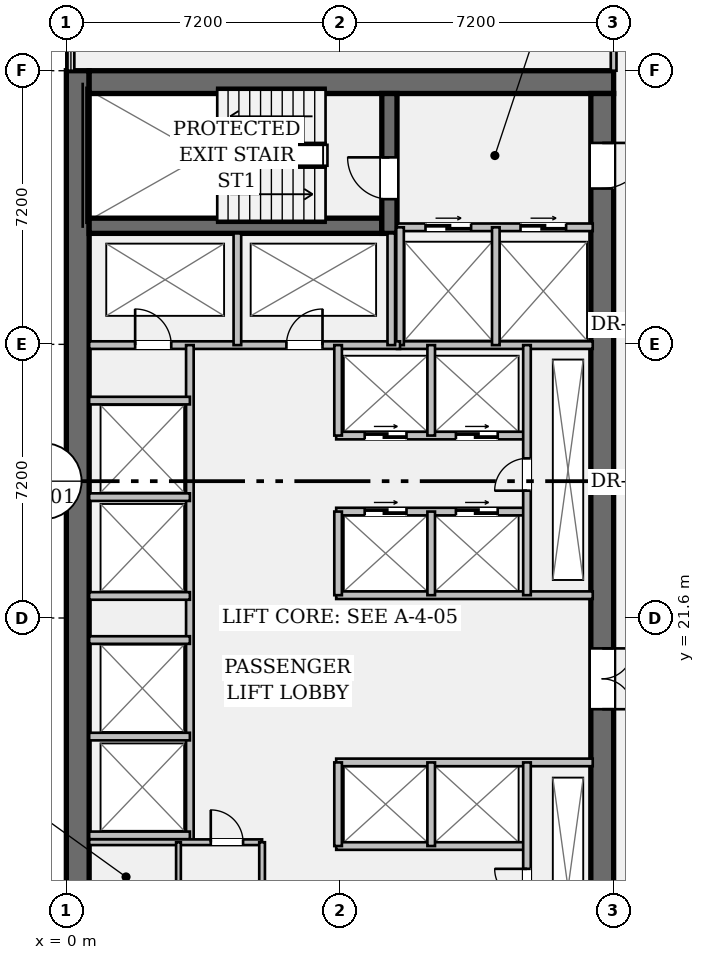
"""IFC4 building model, lengths in metres.
Left out: names, types, materials, properties, quantities, classifications, styles, units other than length and angle.
Written with IfcOpenShell. Run it as: python <this file> out.ifc"""

import sys

from ifc_helpers import new_model, si_unit, direction, frame, frame_2d, origin, place, context, subcontext, project, spatial, rectangle, extrude, element, fill, save


model = new_model("IFC4")
c1 = context("Model", 3, precision=1e-05, world=origin(), true_north=direction((0.0, 1.0)))
c2 = subcontext(c1, "Body", "Model", "MODEL_VIEW")
j1 = project(units=[si_unit("LENGTHUNIT", "METRE"), si_unit("PLANEANGLEUNIT", "RADIAN")], contexts=[c1])
p1 = place(None, origin())
s1 = spatial("IfcSite", under=j1, at=p1, CompositionType="ELEMENT")
p2 = place(p1, origin())
s2 = spatial("IfcBuilding", under=s1, at=p2, CompositionType="ELEMENT")
p3 = place(p2, frame((0.0, 0.0, 81.2)))
s3 = spatial("IfcBuildingStorey", under=s2, at=p3, CompositionType="ELEMENT", Elevation=81.2)
p4 = place(p3, frame((0.3, 7.2, 0.0), z_axis=(0.0, 0.0, 1.0), x_axis=(0.0, 1.0, 0.0)))
e1 = element("IfcWall", 1, at=p4, inside=s3, PredefinedType="SHEAR", context=c2, shape_type="SweptSolid", body=[
    extrude(rectangle(XDim=28.8, YDim=0.6, at=frame_2d((14.4, 0.0))), origin(), (0.0, 0.0, 1.0), 3.57),
])
p5 = place(p3, frame((0.6, 35.7, 0.0), z_axis=(0.0, 0.0, 1.0), x_axis=(1.0, 0.0, 0.0)))
e2 = element("IfcWall", 2, at=p5, inside=s3, PredefinedType="SHEAR", context=c2, shape_type="SweptSolid", body=[
    extrude(rectangle(XDim=13.8, YDim=0.6, at=frame_2d((6.9, 0.0))), origin(), (0.0, 0.0, 1.0), 3.57),
])
p6 = place(p3, frame((14.1, 35.4, 0.0), z_axis=(0.0, 0.0, 1.0), x_axis=(0.0, -1.0, 0.0)))
e3 = element("IfcWall", 3, at=p6, inside=s3, PredefinedType="SHEAR", context=c2, shape_type="SweptSolid", body=[
    extrude(rectangle(XDim=27.6, YDim=0.6, at=frame_2d((13.8, 0.0))), origin(), (0.0, 0.0, 1.0), 3.57),
])
p7 = place(p6, frame((1.3, 0.0, 0.0)))
e4 = element("IfcOpeningElement", 4, at=p7, cuts=e3, PredefinedType="OPENING", context=c2, shape_type="SweptSolid", body=[
    extrude(rectangle(XDim=1.2, YDim=2.15, at=frame_2d((0.6, 1.075))), frame((0.0, 0.312, 0.0), z_axis=(0.0, -1.0, 0.0), x_axis=(1.0, 0.0, 0.0)), (0.0, 0.0, 1.0), 0.624),
])
p8 = place(p6, frame((25.25, 0.0, 0.0)))
e5 = element("IfcOpeningElement", 5, at=p8, cuts=e3, PredefinedType="OPENING", context=c2, shape_type="SweptSolid", body=[
    extrude(rectangle(XDim=1.2, YDim=2.15, at=frame_2d((0.6, 1.075))), frame((0.0, 0.312, 0.0), z_axis=(0.0, -1.0, 0.0), x_axis=(1.0, 0.0, 0.0)), (0.0, 0.0, 1.0), 0.624),
])
p9 = place(p6, frame((14.6, 0.0, 0.0)))
e6 = element("IfcOpeningElement", 6, at=p9, cuts=e3, PredefinedType="OPENING", context=c2, shape_type="SweptSolid", body=[
    extrude(rectangle(XDim=1.6, YDim=2.2, at=frame_2d((0.8, 1.1))), frame((0.0, 0.312, 0.0), z_axis=(0.0, -1.0, 0.0), x_axis=(1.0, 0.0, 0.0)), (0.0, 0.0, 1.0), 0.624),
])
p10 = place(p3, frame((0.6, 31.92, 0.0), z_axis=(0.0, 0.0, 1.0), x_axis=(1.0, 0.0, 0.0)))
e7 = element("IfcWall", 7, at=p10, inside=s3, PredefinedType="SHEAR", context=c2, shape_type="SweptSolid", body=[
    extrude(rectangle(XDim=7.7, YDim=0.4, at=frame_2d((3.85, 0.0))), origin(), (0.0, 0.0, 1.0), 3.57),
])
p11 = place(p3, frame((8.5, 31.72, 0.0), z_axis=(0.0, 0.0, 1.0), x_axis=(0.0, 1.0, 0.0)))
e8 = element("IfcWall", 8, at=p11, inside=s3, PredefinedType="SHEAR", context=c2, shape_type="SweptSolid", body=[
    extrude(rectangle(XDim=3.68, YDim=0.4, at=frame_2d((1.84, 0.0))), origin(), (0.0, 0.0, 1.0), 3.57),
])
p12 = place(p11, frame((0.9, 0.0, 0.0)))
e9 = element("IfcOpeningElement", 9, at=p12, cuts=e8, PredefinedType="OPENING", context=c2, shape_type="SweptSolid", body=[
    extrude(rectangle(XDim=1.1, YDim=2.15, at=frame_2d((0.55, 1.075))), frame((0.0, 0.212, 0.0), z_axis=(0.0, -1.0, 0.0), x_axis=(1.0, 0.0, 0.0)), (0.0, 0.0, 1.0), 0.424),
])
p13 = place(p3, frame((8.7, 31.88, 0.0), z_axis=(0.0, 0.0, 1.0), x_axis=(1.0, 0.0, 0.0)))
e10 = element("IfcWall", 10, at=p13, inside=s3, PredefinedType="PARTITIONING", context=c2, shape_type="SweptSolid", body=[
    extrude(rectangle(XDim=5.15, YDim=0.2, at=frame_2d((2.575, 0.0))), origin(), (0.0, 0.0, 1.0), 3.57),
])
p14 = place(p13, frame((0.75, 0.0, 0.0)))
e11 = element("IfcOpeningElement", 11, at=p14, cuts=e10, PredefinedType="OPENING", context=c2, shape_type="SweptSolid", body=[
    extrude(rectangle(XDim=1.2, YDim=2.2, at=frame_2d((0.6, 1.1))), frame((0.0, 0.112, 0.0), z_axis=(0.0, -1.0, 0.0), x_axis=(1.0, 0.0, 0.0)), (0.0, 0.0, 1.0), 0.224),
])
p15 = place(p13, frame((3.25, 0.0, 0.0)))
e12 = element("IfcOpeningElement", 12, at=p15, cuts=e10, PredefinedType="OPENING", context=c2, shape_type="SweptSolid", body=[
    extrude(rectangle(XDim=1.2, YDim=2.2, at=frame_2d((0.6, 1.1))), frame((0.0, 0.112, 0.0), z_axis=(0.0, -1.0, 0.0), x_axis=(1.0, 0.0, 0.0)), (0.0, 0.0, 1.0), 0.224),
])
p16 = place(p3, frame((8.7, 28.78, 0.0), z_axis=(0.0, 0.0, 1.0), x_axis=(1.0, 0.0, 0.0)))
e13 = element("IfcWall", 13, at=p16, inside=s3, PredefinedType="PARTITIONING", context=c2, shape_type="SweptSolid", body=[
    extrude(rectangle(XDim=5.15, YDim=0.2, at=frame_2d((2.575, 0.0))), origin(), (0.0, 0.0, 1.0), 3.57),
])
for number, where, z_axis, x_axis in (
    (14, (8.78, 28.78, 0.0), (0.0, 0.0, 1.0), (0.0, 1.0, 0.0)),
    (15, (11.3, 28.78, 0.0), (0.0, 0.0, 1.0), (0.0, 1.0, 0.0)),
):
    element("IfcWall", number, at=place(p3, frame(where, z_axis=z_axis, x_axis=x_axis)), inside=s3, PredefinedType="PARTITIONING", context=c2, shape_type="SweptSolid", body=[
        extrude(rectangle(XDim=3.1, YDim=0.2, at=frame_2d((1.55, 0.0))), origin(), (0.0, 0.0, 1.0), 3.57),
    ])
p17 = place(p3, frame((0.6, 28.78, 0.0), z_axis=(0.0, 0.0, 1.0), x_axis=(1.0, 0.0, 0.0)))
e16 = element("IfcWall", 16, at=p17, inside=s3, PredefinedType="PARTITIONING", context=c2, shape_type="SweptSolid", body=[
    extrude(rectangle(XDim=8.18, YDim=0.2, at=frame_2d((4.09, 0.0))), origin(), (0.0, 0.0, 1.0), 3.57),
])
p18 = place(p17, frame((1.21, 0.0, 0.0)))
e17 = element("IfcOpeningElement", 17, at=p18, cuts=e16, PredefinedType="OPENING", context=c2, shape_type="SweptSolid", body=[
    extrude(rectangle(XDim=0.95, YDim=2.15, at=frame_2d((0.475, 1.075))), frame((0.0, 0.112, 0.0), z_axis=(0.0, -1.0, 0.0), x_axis=(1.0, 0.0, 0.0)), (0.0, 0.0, 1.0), 0.224),
])
p19 = place(p17, frame((5.19, 0.0, 0.0)))
e18 = element("IfcOpeningElement", 18, at=p19, cuts=e16, PredefinedType="OPENING", context=c2, shape_type="SweptSolid", body=[
    extrude(rectangle(XDim=0.95, YDim=2.15, at=frame_2d((0.475, 1.075))), frame((0.0, 0.112, 0.0), z_axis=(0.0, -1.0, 0.0), x_axis=(1.0, 0.0, 0.0)), (0.0, 0.0, 1.0), 0.224),
])
for number, where, z_axis, x_axis in (
    (19, (4.5, 28.78, 0.0), (0.0, 0.0, 1.0), (0.0, 1.0, 0.0)),
    (20, (8.55, 28.78, 0.0), (0.0, 0.0, 1.0), (0.0, 1.0, 0.0)),
):
    element("IfcWall", number, at=place(p3, frame(where, z_axis=z_axis, x_axis=x_axis)), inside=s3, PredefinedType="PARTITIONING", context=c2, shape_type="SweptSolid", body=[
        extrude(rectangle(XDim=2.94, YDim=0.2, at=frame_2d((1.47, 0.0))), origin(), (0.0, 0.0, 1.0), 3.57),
    ])
p20 = place(p3, frame((3.25, 15.7, 0.0), z_axis=(0.0, 0.0, 1.0), x_axis=(0.0, 1.0, 0.0)))
e21 = element("IfcWall", 21, at=p20, inside=s3, PredefinedType="PARTITIONING", context=c2, shape_type="SweptSolid", body=[
    extrude(rectangle(XDim=13.08, YDim=0.2, at=frame_2d((6.54, 0.0))), origin(), (0.0, 0.0, 1.0), 3.57),
])
for number, where, z_axis, x_axis in (
    (22, (0.6, 15.88, 0.0), (0.0, 0.0, 1.0), (1.0, 0.0, 0.0)),
    (23, (0.6, 18.48, 0.0), (0.0, 0.0, 1.0), (1.0, 0.0, 0.0)),
    (24, (0.6, 22.18, 0.0), (0.0, 0.0, 1.0), (1.0, 0.0, 0.0)),
    (25, (0.6, 24.78, 0.0), (0.0, 0.0, 1.0), (1.0, 0.0, 0.0)),
    (26, (0.6, 21.02, 0.0), (0.0, 0.0, 1.0), (1.0, 0.0, 0.0)),
    (27, (0.6, 27.32, 0.0), (0.0, 0.0, 1.0), (1.0, 0.0, 0.0)),
):
    element("IfcWall", number, at=place(p3, frame(where, z_axis=z_axis, x_axis=x_axis)), inside=s3, PredefinedType="PARTITIONING", context=c2, shape_type="SweptSolid", body=[
        extrude(rectangle(XDim=2.65, YDim=0.2, at=frame_2d((1.325, 0.0))), origin(), (0.0, 0.0, 1.0), 3.57),
    ])
p21 = place(p3, frame((7.1, 22.2, 0.0), z_axis=(0.0, 0.0, 1.0), x_axis=(1.0, 0.0, 0.0)))
e28 = element("IfcWall", 28, at=p21, inside=s3, PredefinedType="PARTITIONING", context=c2, shape_type="SweptSolid", body=[
    extrude(rectangle(XDim=6.75, YDim=0.2, at=frame_2d((3.375, 0.0))), origin(), (0.0, 0.0, 1.0), 3.57),
])
p22 = place(p3, frame((7.1, 24.4, 0.0), z_axis=(0.0, 0.0, 1.0), x_axis=(1.0, 0.0, 0.0)))
e29 = element("IfcWall", 29, at=p22, inside=s3, PredefinedType="PARTITIONING", context=c2, shape_type="SweptSolid", body=[
    extrude(rectangle(XDim=5.02, YDim=0.2, at=frame_2d((2.51, 0.0))), origin(), (0.0, 0.0, 1.0), 3.57),
])
p23 = place(p22, frame((0.75, 0.0, 0.0)))
e30 = element("IfcOpeningElement", 30, at=p23, cuts=e29, PredefinedType="OPENING", context=c2, shape_type="SweptSolid", body=[
    extrude(rectangle(XDim=1.1, YDim=2.2, at=frame_2d((0.55, 1.1))), frame((0.0, 0.112, 0.0), z_axis=(0.0, -1.0, 0.0), x_axis=(1.0, 0.0, 0.0)), (0.0, 0.0, 1.0), 0.224),
])
p24 = place(p22, frame((3.15, 0.0, 0.0)))
e31 = element("IfcOpeningElement", 31, at=p24, cuts=e29, PredefinedType="OPENING", context=c2, shape_type="SweptSolid", body=[
    extrude(rectangle(XDim=1.1, YDim=2.2, at=frame_2d((0.55, 1.1))), frame((0.0, 0.112, 0.0), z_axis=(0.0, -1.0, 0.0), x_axis=(1.0, 0.0, 0.0)), (0.0, 0.0, 1.0), 0.224),
])
p25 = place(p3, frame((7.1, 26.4, 0.0), z_axis=(0.0, 0.0, 1.0), x_axis=(1.0, 0.0, 0.0)))
e32 = element("IfcWall", 32, at=p25, inside=s3, PredefinedType="PARTITIONING", context=c2, shape_type="SweptSolid", body=[
    extrude(rectangle(XDim=5.02, YDim=0.2, at=frame_2d((2.51, 0.0))), origin(), (0.0, 0.0, 1.0), 3.57),
])
p26 = place(p25, frame((0.75, 0.0, 0.0)))
e33 = element("IfcOpeningElement", 33, at=p26, cuts=e32, PredefinedType="OPENING", context=c2, shape_type="SweptSolid", body=[
    extrude(rectangle(XDim=1.1, YDim=2.2, at=frame_2d((0.55, 1.1))), frame((0.0, 0.112, 0.0), z_axis=(0.0, -1.0, 0.0), x_axis=(1.0, 0.0, 0.0)), (0.0, 0.0, 1.0), 0.224),
])
p27 = place(p25, frame((3.15, 0.0, 0.0)))
e34 = element("IfcOpeningElement", 34, at=p27, cuts=e32, PredefinedType="OPENING", context=c2, shape_type="SweptSolid", body=[
    extrude(rectangle(XDim=1.1, YDim=2.2, at=frame_2d((0.55, 1.1))), frame((0.0, 0.112, 0.0), z_axis=(0.0, -1.0, 0.0), x_axis=(1.0, 0.0, 0.0)), (0.0, 0.0, 1.0), 0.224),
])
p28 = place(p3, frame((7.15, 22.2, 0.0), z_axis=(0.0, 0.0, 1.0), x_axis=(0.0, 1.0, 0.0)))
e35 = element("IfcWall", 35, at=p28, inside=s3, PredefinedType="PARTITIONING", context=c2, shape_type="SweptSolid", body=[
    extrude(rectangle(XDim=2.2, YDim=0.2, at=frame_2d((1.1, 0.0))), origin(), (0.0, 0.0, 1.0), 3.57),
])
p29 = place(p3, frame((7.15, 26.4, 0.0), z_axis=(0.0, 0.0, 1.0), x_axis=(0.0, 1.0, 0.0)))
e36 = element("IfcWall", 36, at=p29, inside=s3, PredefinedType="PARTITIONING", context=c2, shape_type="SweptSolid", body=[
    extrude(rectangle(XDim=2.38, YDim=0.2, at=frame_2d((1.19, 0.0))), origin(), (0.0, 0.0, 1.0), 3.57),
])
p30 = place(p3, frame((9.6, 22.2, 0.0), z_axis=(0.0, 0.0, 1.0), x_axis=(0.0, 1.0, 0.0)))
e37 = element("IfcWall", 37, at=p30, inside=s3, PredefinedType="PARTITIONING", context=c2, shape_type="SweptSolid", body=[
    extrude(rectangle(XDim=2.2, YDim=0.2, at=frame_2d((1.1, 0.0))), origin(), (0.0, 0.0, 1.0), 3.57),
])
p31 = place(p3, frame((9.6, 26.4, 0.0), z_axis=(0.0, 0.0, 1.0), x_axis=(0.0, 1.0, 0.0)))
e38 = element("IfcWall", 38, at=p31, inside=s3, PredefinedType="PARTITIONING", context=c2, shape_type="SweptSolid", body=[
    extrude(rectangle(XDim=2.38, YDim=0.2, at=frame_2d((1.19, 0.0))), origin(), (0.0, 0.0, 1.0), 3.57),
])
p32 = place(p3, frame((12.12, 22.2, 0.0), z_axis=(0.0, 0.0, 1.0), x_axis=(0.0, 1.0, 0.0)))
e39 = element("IfcWall", 39, at=p32, inside=s3, PredefinedType="PARTITIONING", context=c2, shape_type="SweptSolid", body=[
    extrude(rectangle(XDim=6.58, YDim=0.2, at=frame_2d((3.29, 0.0))), origin(), (0.0, 0.0, 1.0), 3.57),
])
p33 = place(p32, frame((2.75, 0.0, 0.0)))
e40 = element("IfcOpeningElement", 40, at=p33, cuts=e39, PredefinedType="OPENING", context=c2, shape_type="SweptSolid", body=[
    extrude(rectangle(XDim=0.85, YDim=2.15, at=frame_2d((0.425, 1.075))), frame((0.0, 0.112, 0.0), z_axis=(0.0, -1.0, 0.0), x_axis=(1.0, 0.0, 0.0)), (0.0, 0.0, 1.0), 0.224),
])
p34 = place(p3, frame((7.1, 17.8, 0.0), z_axis=(0.0, 0.0, 1.0), x_axis=(1.0, 0.0, 0.0)))
e41 = element("IfcWall", 41, at=p34, inside=s3, PredefinedType="PARTITIONING", context=c2, shape_type="SweptSolid", body=[
    extrude(rectangle(XDim=6.75, YDim=0.2, at=frame_2d((3.375, 0.0))), origin(), (0.0, 0.0, 1.0), 3.57),
])
p35 = place(p3, frame((7.1, 15.6, 0.0), z_axis=(0.0, 0.0, 1.0), x_axis=(1.0, 0.0, 0.0)))
e42 = element("IfcWall", 42, at=p35, inside=s3, PredefinedType="PARTITIONING", context=c2, shape_type="SweptSolid", body=[
    extrude(rectangle(XDim=5.02, YDim=0.2, at=frame_2d((2.51, 0.0))), origin(), (0.0, 0.0, 1.0), 3.57),
])
for number, where, z_axis, x_axis in (
    (43, (7.15, 15.6, 0.0), (0.0, 0.0, 1.0), (0.0, 1.0, 0.0)),
    (44, (9.6, 15.6, 0.0), (0.0, 0.0, 1.0), (0.0, 1.0, 0.0)),
):
    element("IfcWall", number, at=place(p3, frame(where, z_axis=z_axis, x_axis=x_axis)), inside=s3, PredefinedType="PARTITIONING", context=c2, shape_type="SweptSolid", body=[
        extrude(rectangle(XDim=2.2, YDim=0.2, at=frame_2d((1.1, 0.0))), origin(), (0.0, 0.0, 1.0), 3.57),
    ])
p36 = place(p3, frame((12.12, 11.2, 0.0), z_axis=(0.0, 0.0, 1.0), x_axis=(0.0, 1.0, 0.0)))
e45 = element("IfcWall", 45, at=p36, inside=s3, PredefinedType="PARTITIONING", context=c2, shape_type="SweptSolid", body=[
    extrude(rectangle(XDim=6.6, YDim=0.2, at=frame_2d((3.3, 0.0))), origin(), (0.0, 0.0, 1.0), 3.57),
])
p37 = place(p36, frame((2.95, 0.0, 0.0)))
e46 = element("IfcOpeningElement", 46, at=p37, cuts=e45, PredefinedType="OPENING", context=c2, shape_type="SweptSolid", body=[
    extrude(rectangle(XDim=0.85, YDim=2.15, at=frame_2d((0.425, 1.075))), frame((0.0, 0.112, 0.0), z_axis=(0.0, -1.0, 0.0), x_axis=(1.0, 0.0, 0.0)), (0.0, 0.0, 1.0), 0.224),
])
p38 = place(p3, frame((0.6, 15.7, 0.0), z_axis=(0.0, 0.0, 1.0), x_axis=(1.0, 0.0, 0.0)))
e47 = element("IfcWall", 47, at=p38, inside=s3, PredefinedType="PARTITIONING", context=c2, shape_type="SweptSolid", body=[
    extrude(rectangle(XDim=4.55, YDim=0.15, at=frame_2d((2.275, 0.0))), origin(), (0.0, 0.0, 1.0), 3.57),
])
p39 = place(p38, frame((3.2, 0.0, 0.0)))
e48 = element("IfcOpeningElement", 48, at=p39, cuts=e47, PredefinedType="OPENING", context=c2, shape_type="SweptSolid", body=[
    extrude(rectangle(XDim=0.85, YDim=2.15, at=frame_2d((0.425, 1.075))), frame((0.0, 0.087, 0.0), z_axis=(0.0, -1.0, 0.0), x_axis=(1.0, 0.0, 0.0)), (0.0, 0.0, 1.0), 0.174),
])
p40 = place(p3, frame((5.15, 11.28, 0.0), z_axis=(0.0, 0.0, 1.0), x_axis=(0.0, 1.0, 0.0)))
e49 = element("IfcWall", 49, at=p40, inside=s3, PredefinedType="PARTITIONING", context=c2, shape_type="SweptSolid", body=[
    extrude(rectangle(XDim=4.42, YDim=0.15, at=frame_2d((2.21, 0.0))), origin(), (0.0, 0.0, 1.0), 3.57),
])
p41 = place(p3, frame((2.95, 11.28, 0.0), z_axis=(0.0, 0.0, 1.0), x_axis=(0.0, 1.0, 0.0)))
e50 = element("IfcWall", 50, at=p41, inside=s3, PredefinedType="PARTITIONING", context=c2, shape_type="SweptSolid", body=[
    extrude(rectangle(XDim=4.42, YDim=0.125, at=frame_2d((2.21, 0.0))), origin(), (0.0, 0.0, 1.0), 3.57),
])
p42 = place(p41, frame((1.6, 0.0, 0.0)))
e51 = element("IfcOpeningElement", 51, at=p42, cuts=e50, PredefinedType="OPENING", context=c2, shape_type="SweptSolid", body=[
    extrude(rectangle(XDim=0.85, YDim=2.15, at=frame_2d((0.425, 1.075))), frame((0.0, 0.074, 0.0), z_axis=(0.0, -1.0, 0.0), x_axis=(1.0, 0.0, 0.0)), (0.0, 0.0, 1.0), 0.149),
])
p43 = place(p3, frame((14.4, 36.0, 0.0), z_axis=(0.0, 0.0, 1.0), x_axis=(0.0, 1.0, 0.0)))
e52 = element("IfcWall", 52, at=p43, inside=s3, PredefinedType="PARTITIONING", context=c2, shape_type="SweptSolid", body=[
    extrude(rectangle(XDim=7.08, YDim=0.15, at=frame_2d((3.54, 0.0))), origin(), (0.0, 0.0, 1.0), 2.783),
])
p44 = place(p43, frame((0.65, 0.0, 0.0)))
e53 = element("IfcOpeningElement", 53, at=p44, cuts=e52, PredefinedType="OPENING", context=c2, shape_type="SweptSolid", body=[
    extrude(rectangle(XDim=0.9, YDim=2.15, at=frame_2d((0.45, 1.075))), frame((0.0, 0.087, 0.0), z_axis=(0.0, -1.0, 0.0), x_axis=(1.0, 0.0, 0.0)), (0.0, 0.0, 1.0), 0.174),
])
p45 = place(p12, origin())
e54 = element("IfcDoor", 54, at=p45, inside=s3, OperationType="SINGLE_SWING_RIGHT", PredefinedType="DOOR", context=c2, shape_type="SweptSolid", body=[
    extrude(rectangle(XDim=1.1, YDim=2.15, at=frame_2d((0.55, 1.075))), frame((0.0, 0.025, 0.0), z_axis=(0.0, -1.0, 0.0), x_axis=(1.0, 0.0, 0.0)), (0.0, 0.0, 1.0), 0.05),
])
fill(e9, e54)
p46 = place(p7, origin())
e55 = element("IfcDoor", 55, at=p46, inside=s3, OperationType="SINGLE_SWING_LEFT", PredefinedType="DOOR", context=c2, shape_type="SweptSolid", body=[
    extrude(rectangle(XDim=1.2, YDim=2.15, at=frame_2d((0.6, 1.075))), frame((0.0, 0.025, 0.0), z_axis=(0.0, -1.0, 0.0), x_axis=(1.0, 0.0, 0.0)), (0.0, 0.0, 1.0), 0.05),
])
fill(e4, e55)
p47 = place(p14, origin())
e56 = element("IfcDoor", 56, at=p47, inside=s3, OperationType="DOUBLE_DOOR_SLIDING", PredefinedType="DOOR", context=c2, shape_type="SweptSolid", body=[
    extrude(rectangle(XDim=1.2, YDim=2.2, at=frame_2d((0.6, 1.1))), frame((0.0, 0.025, 0.0), z_axis=(0.0, -1.0, 0.0), x_axis=(1.0, 0.0, 0.0)), (0.0, 0.0, 1.0), 0.05),
])
fill(e11, e56)
p48 = place(p15, origin())
e57 = element("IfcDoor", 57, at=p48, inside=s3, OperationType="DOUBLE_DOOR_SLIDING", PredefinedType="DOOR", context=c2, shape_type="SweptSolid", body=[
    extrude(rectangle(XDim=1.2, YDim=2.2, at=frame_2d((0.6, 1.1))), frame((0.0, 0.025, 0.0), z_axis=(0.0, -1.0, 0.0), x_axis=(1.0, 0.0, 0.0)), (0.0, 0.0, 1.0), 0.05),
])
fill(e12, e57)
p49 = place(p18, origin())
e58 = element("IfcDoor", 58, at=p49, inside=s3, OperationType="SINGLE_SWING_LEFT", PredefinedType="DOOR", context=c2, shape_type="SweptSolid", body=[
    extrude(rectangle(XDim=0.95, YDim=2.15, at=frame_2d((0.475, 1.075))), frame((0.0, 0.025, 0.0), z_axis=(0.0, -1.0, 0.0), x_axis=(1.0, 0.0, 0.0)), (0.0, 0.0, 1.0), 0.05),
])
fill(e17, e58)
p50 = place(p19, origin())
e59 = element("IfcDoor", 59, at=p50, inside=s3, OperationType="SINGLE_SWING_RIGHT", PredefinedType="DOOR", context=c2, shape_type="SweptSolid", body=[
    extrude(rectangle(XDim=0.95, YDim=2.15, at=frame_2d((0.475, 1.075))), frame((0.0, 0.025, 0.0), z_axis=(0.0, -1.0, 0.0), x_axis=(1.0, 0.0, 0.0)), (0.0, 0.0, 1.0), 0.05),
])
fill(e18, e59)
p51 = place(p9, origin())
e60 = element("IfcDoor", 60, at=p51, inside=s3, OperationType="DOUBLE_DOOR_SINGLE_SWING", PredefinedType="DOOR", context=c2, shape_type="SweptSolid", body=[
    extrude(rectangle(XDim=1.6, YDim=2.2, at=frame_2d((0.8, 1.1))), frame((0.0, 0.025, 0.0), z_axis=(0.0, -1.0, 0.0), x_axis=(1.0, 0.0, 0.0)), (0.0, 0.0, 1.0), 0.05),
])
fill(e6, e60)
p52 = place(p33, origin())
e61 = element("IfcDoor", 61, at=p52, inside=s3, OperationType="SINGLE_SWING_LEFT", PredefinedType="DOOR", context=c2, shape_type="SweptSolid", body=[
    extrude(rectangle(XDim=0.85, YDim=2.15, at=frame_2d((0.425, 1.075))), frame((0.0, 0.025, 0.0), z_axis=(0.0, -1.0, 0.0), x_axis=(1.0, 0.0, 0.0)), (0.0, 0.0, 1.0), 0.05),
])
fill(e40, e61)
p53 = place(p23, origin())
e62 = element("IfcDoor", 62, at=p53, inside=s3, OperationType="DOUBLE_DOOR_SLIDING", PredefinedType="DOOR", context=c2, shape_type="SweptSolid", body=[
    extrude(rectangle(XDim=1.1, YDim=2.2, at=frame_2d((0.55, 1.1))), frame((0.0, 0.025, 0.0), z_axis=(0.0, -1.0, 0.0), x_axis=(1.0, 0.0, 0.0)), (0.0, 0.0, 1.0), 0.05),
])
fill(e30, e62)
p54 = place(p24, origin())
e63 = element("IfcDoor", 63, at=p54, inside=s3, OperationType="DOUBLE_DOOR_SLIDING", PredefinedType="DOOR", context=c2, shape_type="SweptSolid", body=[
    extrude(rectangle(XDim=1.1, YDim=2.2, at=frame_2d((0.55, 1.1))), frame((0.0, 0.025, 0.0), z_axis=(0.0, -1.0, 0.0), x_axis=(1.0, 0.0, 0.0)), (0.0, 0.0, 1.0), 0.05),
])
fill(e31, e63)
p55 = place(p26, origin())
e64 = element("IfcDoor", 64, at=p55, inside=s3, OperationType="DOUBLE_DOOR_SLIDING", PredefinedType="DOOR", context=c2, shape_type="SweptSolid", body=[
    extrude(rectangle(XDim=1.1, YDim=2.2, at=frame_2d((0.55, 1.1))), frame((0.0, 0.025, 0.0), z_axis=(0.0, -1.0, 0.0), x_axis=(1.0, 0.0, 0.0)), (0.0, 0.0, 1.0), 0.05),
])
fill(e33, e64)
p56 = place(p27, origin())
e65 = element("IfcDoor", 65, at=p56, inside=s3, OperationType="DOUBLE_DOOR_SLIDING", PredefinedType="DOOR", context=c2, shape_type="SweptSolid", body=[
    extrude(rectangle(XDim=1.1, YDim=2.2, at=frame_2d((0.55, 1.1))), frame((0.0, 0.025, 0.0), z_axis=(0.0, -1.0, 0.0), x_axis=(1.0, 0.0, 0.0)), (0.0, 0.0, 1.0), 0.05),
])
fill(e34, e65)
p57 = place(p37, origin())
e66 = element("IfcDoor", 66, at=p57, inside=s3, OperationType="SINGLE_SWING_RIGHT", PredefinedType="DOOR", context=c2, shape_type="SweptSolid", body=[
    extrude(rectangle(XDim=0.85, YDim=2.15, at=frame_2d((0.425, 1.075))), frame((0.0, 0.025, 0.0), z_axis=(0.0, -1.0, 0.0), x_axis=(1.0, 0.0, 0.0)), (0.0, 0.0, 1.0), 0.05),
])
fill(e46, e66)
p58 = place(p39, origin())
e67 = element("IfcDoor", 67, at=p58, inside=s3, OperationType="SINGLE_SWING_LEFT", PredefinedType="DOOR", context=c2, shape_type="SweptSolid", body=[
    extrude(rectangle(XDim=0.85, YDim=2.15, at=frame_2d((0.425, 1.075))), frame((0.0, 0.025, 0.0), z_axis=(0.0, -1.0, 0.0), x_axis=(1.0, 0.0, 0.0)), (0.0, 0.0, 1.0), 0.05),
])
fill(e48, e67)
save(model, sys.argv[1])
